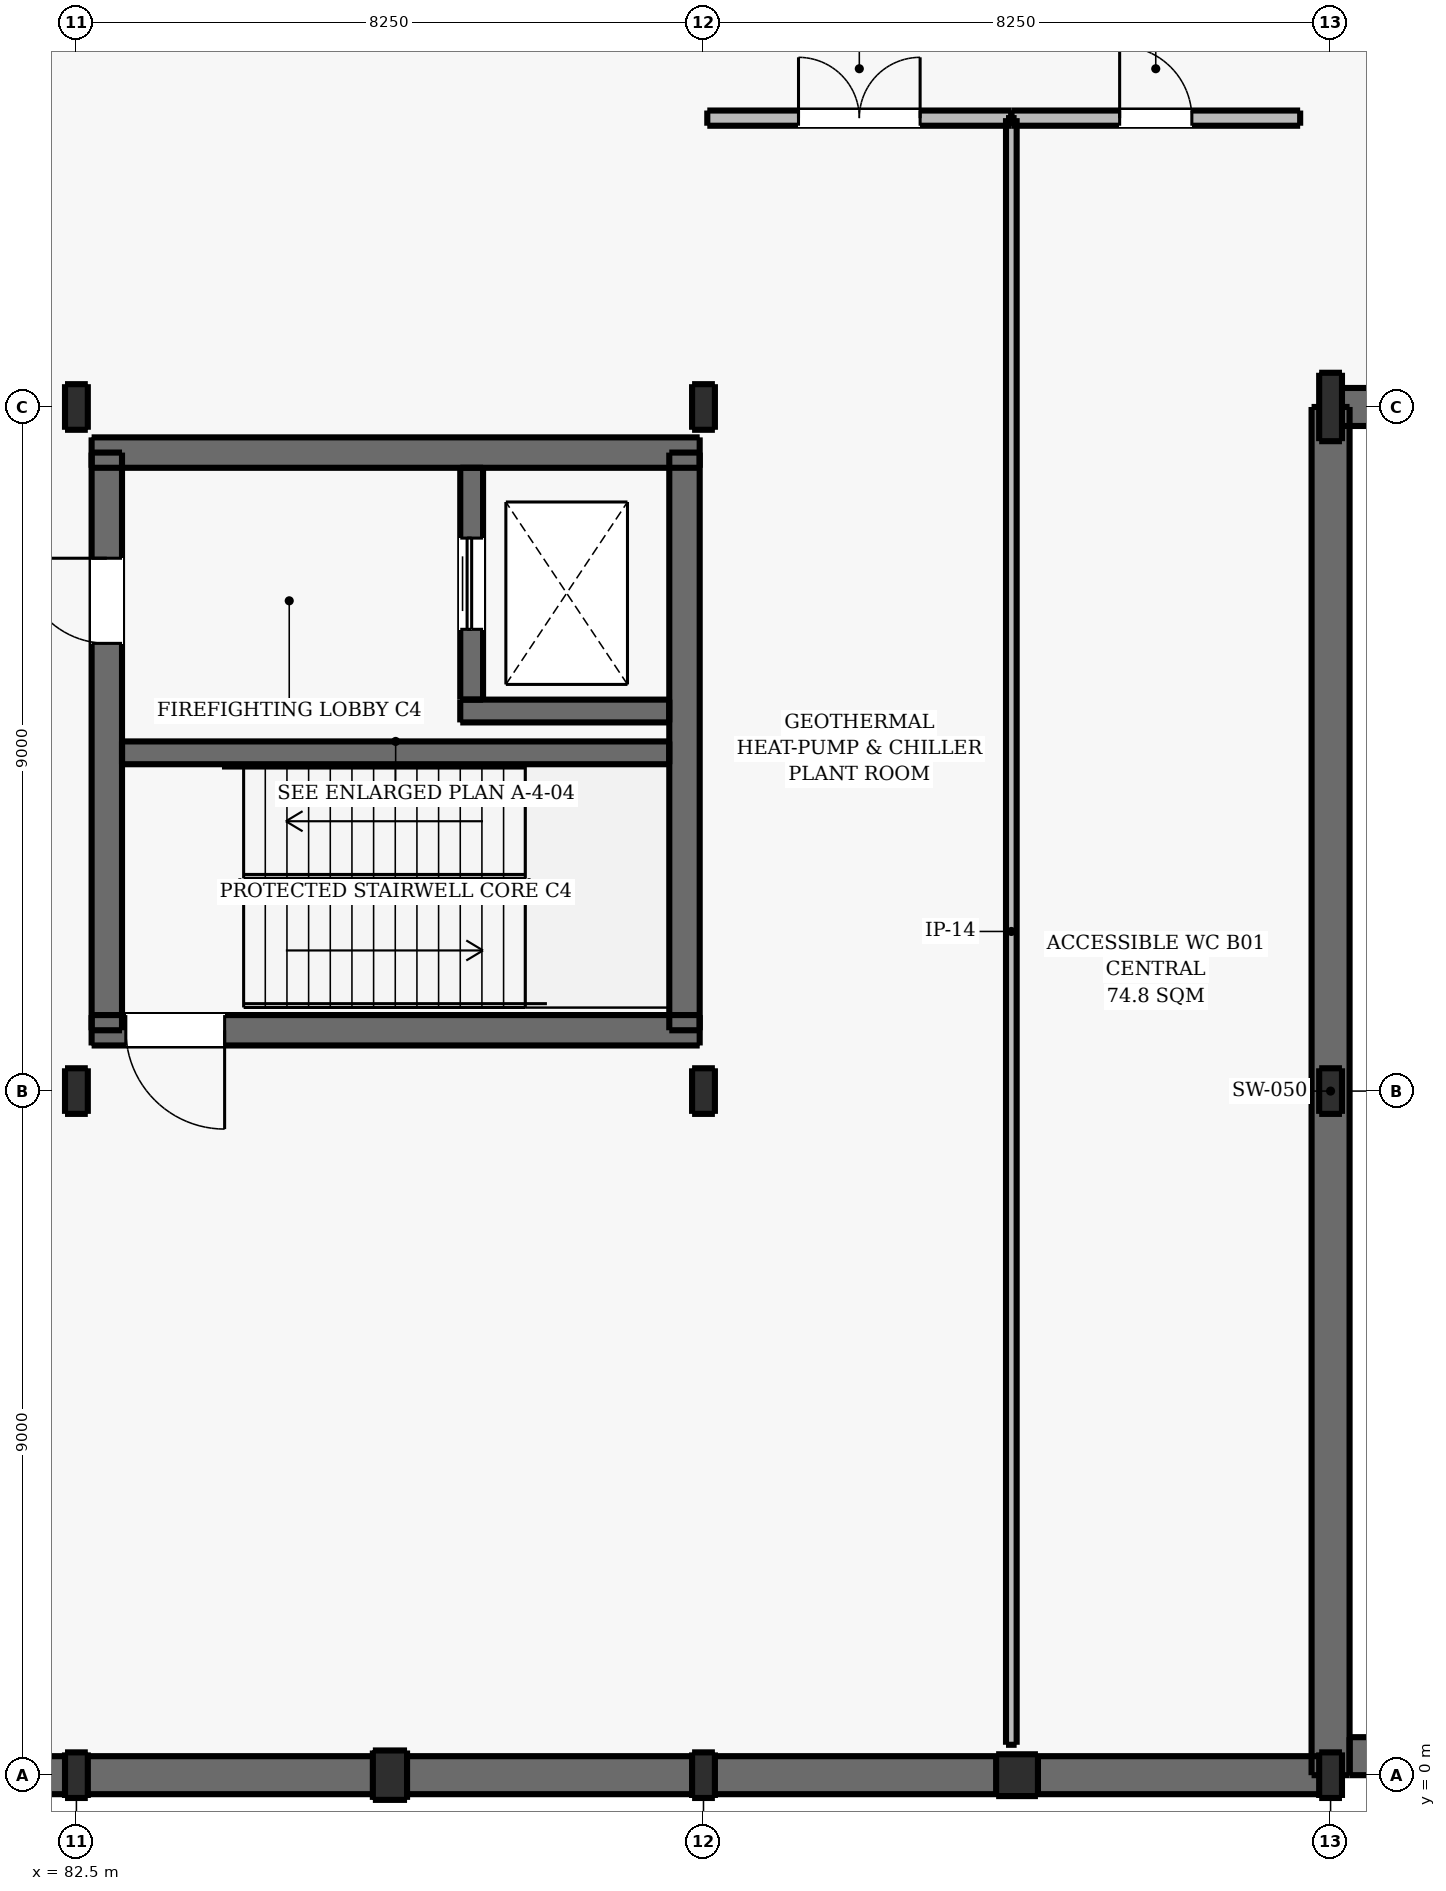
"""IFC4 building model, lengths in metres.
Left out: names, types, materials, properties, quantities, classifications, styles, units other than length and angle.
Written with IfcOpenShell. Run it as: python <this file> out.ifc"""

import sys

from ifc_helpers import new_model, si_unit, direction, frame, frame_2d, origin, origin_2d, place, context, subcontext, project, spatial, rectangle, i_section, extrude, element, fill, save


model = new_model("IFC4")
c1 = context("Model", 3, precision=1e-05, world=origin(), true_north=direction((0.0, 1.0)))
c2 = subcontext(c1, "Body", "Model", "MODEL_VIEW")
j1 = project(units=[si_unit("LENGTHUNIT", "METRE"), si_unit("PLANEANGLEUNIT", "RADIAN")], contexts=[c1])
p1 = place(None, origin())
s1 = spatial("IfcSite", under=j1, at=p1, CompositionType="ELEMENT")
p2 = place(p1, origin())
s2 = spatial("IfcBuilding", under=s1, at=p2, CompositionType="ELEMENT")
p3 = place(p2, frame((0.0, 0.0, -4.8)))
s3 = spatial("IfcBuildingStorey", under=s2, at=p3, CompositionType="ELEMENT", Elevation=-4.8)
for number, where, z_axis, x_axis in (
    (1, (82.5, 0.0, 0.0), (0.0, 0.0, 1.0), (1.0, 0.0, 0.0)),
    (2, (82.5, 9.0, 0.0), (0.0, 0.0, 1.0), (1.0, 0.0, 0.0)),
    (3, (82.5, 18.0, 0.0), (0.0, 0.0, 1.0), (1.0, 0.0, 0.0)),
):
    element("IfcColumn", number, at=place(p3, frame(where, z_axis=z_axis, x_axis=x_axis)), inside=s3, PredefinedType="COLUMN", context=c2, shape_type="SweptSolid", body=[
        extrude(i_section(OverallWidth=0.3, OverallDepth=0.6, WebThickness=0.015, FlangeThickness=0.03, FilletRadius=0.027, at=origin_2d()), origin(), (0.0, 0.0, 1.0), 4.8),
    ])
p4 = place(p3, frame((86.625, 0.0, 0.0), z_axis=(0.0, 0.0, 1.0), x_axis=(1.0, 0.0, 0.0)))
e4 = element("IfcColumn", 4, at=p4, inside=s3, PredefinedType="PILASTER", context=c2, shape_type="SweptSolid", body=[
    extrude(rectangle(XDim=0.45, YDim=0.65, at=origin_2d()), origin(), (0.0, 0.0, 1.0), 4.8),
])
for number, where, z_axis, x_axis in (
    (5, (90.75, 0.0, 0.0), (0.0, 0.0, 1.0), (1.0, 0.0, 0.0)),
    (6, (90.75, 9.0, 0.0), (0.0, 0.0, 1.0), (1.0, 0.0, 0.0)),
    (7, (90.75, 18.0, 0.0), (0.0, 0.0, 1.0), (1.0, 0.0, 0.0)),
):
    element("IfcColumn", number, at=place(p3, frame(where, z_axis=z_axis, x_axis=x_axis)), inside=s3, PredefinedType="COLUMN", context=c2, shape_type="SweptSolid", body=[
        extrude(i_section(OverallWidth=0.3, OverallDepth=0.6, WebThickness=0.015, FlangeThickness=0.03, FilletRadius=0.027, at=origin_2d()), origin(), (0.0, 0.0, 1.0), 4.8),
    ])
p5 = place(p3, frame((94.875, 0.0, 0.0), z_axis=(0.0, 0.0, 1.0), x_axis=(1.0, 0.0, 0.0)))
e8 = element("IfcColumn", 8, at=p5, inside=s3, PredefinedType="PILASTER", context=c2, shape_type="SweptSolid", body=[
    extrude(rectangle(XDim=0.55, YDim=0.55, at=origin_2d()), origin(), (0.0, 0.0, 1.0), 4.8),
])
for number, where, z_axis, x_axis in (
    (9, (99.0, 0.0, 0.0), (0.0, 0.0, 1.0), (1.0, 0.0, 0.0)),
    (10, (99.0, 9.0, 0.0), (0.0, 0.0, 1.0), (1.0, 0.0, 0.0)),
):
    element("IfcColumn", number, at=place(p3, frame(where, z_axis=z_axis, x_axis=x_axis)), inside=s3, PredefinedType="COLUMN", context=c2, shape_type="SweptSolid", body=[
        extrude(i_section(OverallWidth=0.3, OverallDepth=0.6, WebThickness=0.015, FlangeThickness=0.03, FilletRadius=0.027, at=origin_2d()), origin(), (0.0, 0.0, 1.0), 4.8),
    ])
p6 = place(p3, frame((99.0, 18.0, 0.0), z_axis=(0.0, 0.0, 1.0), x_axis=(1.0, 0.0, 0.0)))
e11 = element("IfcColumn", 11, at=p6, inside=s3, PredefinedType="COLUMN", context=c2, shape_type="SweptSolid", body=[
    extrude(i_section(OverallWidth=0.3, OverallDepth=0.9, WebThickness=0.019, FlangeThickness=0.035, FilletRadius=0.03, at=origin_2d()), origin(), (0.0, 0.0, 1.0), 4.8),
])
p7 = place(p3, frame((162.0, 18.0, 0.0), z_axis=(0.0, 0.0, 1.0), x_axis=(-1.0, 0.0, 0.0)))
e12 = element("IfcWall", 12, at=p7, inside=s3, PredefinedType="SOLIDWALL", context=c2, shape_type="SweptSolid", body=[
    extrude(rectangle(XDim=63.0, YDim=0.5, at=frame_2d((31.5, 0.0))), origin(), (0.0, 0.0, 1.0), 4.5),
])
p8 = place(p3, frame((99.0, 18.0, 0.0), z_axis=(0.0, 0.0, 1.0), x_axis=(0.0, -1.0, 0.0)))
e13 = element("IfcWall", 13, at=p8, inside=s3, PredefinedType="SOLIDWALL", context=c2, shape_type="SweptSolid", body=[
    extrude(rectangle(XDim=18.0, YDim=0.5, at=frame_2d((9.0, 0.0))), origin(), (0.0, 0.0, 1.0), 4.5),
])
p9 = place(p3, frame((99.0, 0.0, 0.0), z_axis=(0.0, 0.0, 1.0), x_axis=(-1.0, 0.0, 0.0)))
e14 = element("IfcWall", 14, at=p9, inside=s3, PredefinedType="SOLIDWALL", context=c2, shape_type="SweptSolid", body=[
    extrude(rectangle(XDim=45.0, YDim=0.5, at=frame_2d((22.5, 0.0))), origin(), (0.0, 0.0, 1.0), 4.5),
])
p10 = place(p3, frame((99.25, 0.25, 0.0), z_axis=(0.0, 0.0, 1.0), x_axis=(1.0, 0.0, 0.0)))
e15 = element("IfcWall", 15, at=p10, inside=s3, PredefinedType="SOLIDWALL", context=c2, shape_type="SweptSolid", body=[
    extrude(rectangle(XDim=62.75, YDim=0.5, at=frame_2d((31.375, 0.0))), origin(), (0.0, 0.0, 1.0), 4.5),
])
p11 = place(p3, frame((82.7, 9.8, 0.0), z_axis=(0.0, 0.0, 1.0), x_axis=(1.0, 0.0, 0.0)))
e16 = element("IfcWall", 16, at=p11, inside=s3, PredefinedType="SHEAR", context=c2, shape_type="SweptSolid", body=[
    extrude(rectangle(XDim=8.0, YDim=0.4, at=frame_2d((4.0, 0.0))), origin(), (0.0, 0.0, 1.0), 4.8),
])
p12 = place(p11, frame((0.45, 0.0, 0.0)))
e17 = element("IfcOpeningElement", 17, at=p12, cuts=e16, PredefinedType="OPENING", context=c2, shape_type="SweptSolid", body=[
    extrude(rectangle(XDim=1.3, YDim=2.15, at=frame_2d((0.65, 1.075))), frame((0.0, 0.21, 0.0), z_axis=(0.0, -1.0, 0.0), x_axis=(1.0, 0.0, 0.0)), (0.0, 0.0, 1.0), 0.42),
])
p13 = place(p3, frame((82.7, 17.4, 0.0), z_axis=(0.0, 0.0, 1.0), x_axis=(1.0, 0.0, 0.0)))
e18 = element("IfcWall", 18, at=p13, inside=s3, PredefinedType="SHEAR", context=c2, shape_type="SweptSolid", body=[
    extrude(rectangle(XDim=8.0, YDim=0.4, at=frame_2d((4.0, 0.0))), origin(), (0.0, 0.0, 1.0), 4.8),
])
p14 = place(p3, frame((82.9, 9.8, 0.0), z_axis=(0.0, 0.0, 1.0), x_axis=(0.0, 1.0, 0.0)))
e19 = element("IfcWall", 19, at=p14, inside=s3, PredefinedType="SHEAR", context=c2, shape_type="SweptSolid", body=[
    extrude(rectangle(XDim=7.6, YDim=0.4, at=frame_2d((3.8, 0.0))), origin(), (0.0, 0.0, 1.0), 4.8),
])
p15 = place(p14, frame((5.09, 0.0, 0.0)))
e20 = element("IfcOpeningElement", 20, at=p15, cuts=e19, PredefinedType="OPENING", context=c2, shape_type="SweptSolid", body=[
    extrude(rectangle(XDim=1.12, YDim=2.15, at=frame_2d((0.56, 1.075))), frame((0.0, 0.21, 0.0), z_axis=(0.0, -1.0, 0.0), x_axis=(1.0, 0.0, 0.0)), (0.0, 0.0, 1.0), 0.42),
])
p16 = place(p3, frame((90.5, 9.8, 0.0), z_axis=(0.0, 0.0, 1.0), x_axis=(0.0, 1.0, 0.0)))
e21 = element("IfcWall", 21, at=p16, inside=s3, PredefinedType="SHEAR", context=c2, shape_type="SweptSolid", body=[
    extrude(rectangle(XDim=7.6, YDim=0.4, at=frame_2d((3.8, 0.0))), origin(), (0.0, 0.0, 1.0), 4.8),
])
p17 = place(p3, frame((83.1, 13.45, 0.0), z_axis=(0.0, 0.0, 1.0), x_axis=(1.0, 0.0, 0.0)))
e22 = element("IfcWall", 22, at=p17, inside=s3, PredefinedType="SHEAR", context=c2, shape_type="SweptSolid", body=[
    extrude(rectangle(XDim=7.2, YDim=0.3, at=frame_2d((3.6, 0.0))), origin(), (0.0, 0.0, 1.0), 4.8),
])
p18 = place(p3, frame((87.55, 14.0, 0.0), z_axis=(0.0, 0.0, 1.0), x_axis=(1.0, 0.0, 0.0)))
e23 = element("IfcWall", 23, at=p18, inside=s3, PredefinedType="SHEAR", context=c2, shape_type="SweptSolid", body=[
    extrude(rectangle(XDim=2.75, YDim=0.3, at=frame_2d((1.375, 0.0))), origin(), (0.0, 0.0, 1.0), 4.8),
])
p19 = place(p3, frame((87.7, 14.15, 0.0), z_axis=(0.0, 0.0, 1.0), x_axis=(0.0, 1.0, 0.0)))
e24 = element("IfcWall", 24, at=p19, inside=s3, PredefinedType="SHEAR", context=c2, shape_type="SweptSolid", body=[
    extrude(rectangle(XDim=3.05, YDim=0.3, at=frame_2d((1.525, 0.0))), origin(), (0.0, 0.0, 1.0), 4.8),
])
p20 = place(p19, frame((0.925, 0.0, 0.0)))
e25 = element("IfcOpeningElement", 25, at=p20, cuts=e24, PredefinedType="OPENING", context=c2, shape_type="SweptSolid", body=[
    extrude(rectangle(XDim=1.2, YDim=2.15, at=frame_2d((0.6, 1.075))), frame((0.0, 0.16, 0.0), z_axis=(0.0, -1.0, 0.0), x_axis=(1.0, 0.0, 0.0)), (0.0, 0.0, 1.0), 0.32),
])
p21 = place(p3, frame((90.8, 21.8, 0.0), z_axis=(0.0, 0.0, 1.0), x_axis=(1.0, 0.0, 0.0)))
e26 = element("IfcWall", 26, at=p21, inside=s3, PredefinedType="PARTITIONING", context=c2, shape_type="SweptSolid", body=[
    extrude(rectangle(XDim=4.0, YDim=0.2, at=frame_2d((2.0, 0.0))), origin(), (0.0, 0.0, 1.0), 4.5),
])
p22 = place(p21, frame((1.2, 0.0, 0.0)))
e27 = element("IfcOpeningElement", 27, at=p22, cuts=e26, PredefinedType="OPENING", context=c2, shape_type="SweptSolid", body=[
    extrude(rectangle(XDim=1.6, YDim=2.25, at=frame_2d((0.8, 1.125))), frame((0.0, 0.11, 0.0), z_axis=(0.0, -1.0, 0.0), x_axis=(1.0, 0.0, 0.0)), (0.0, 0.0, 1.0), 0.22),
])
p23 = place(p3, frame((94.8, 0.4, 0.0), z_axis=(0.0, 0.0, 1.0), x_axis=(0.0, 1.0, 0.0)))
e28 = element("IfcWall", 28, at=p23, inside=s3, PredefinedType="PARTITIONING", context=c2, shape_type="SweptSolid", body=[
    extrude(rectangle(XDim=21.4, YDim=0.14, at=frame_2d((10.7, 0.0))), origin(), (0.0, 0.0, 1.0), 4.5),
])
p24 = place(p3, frame((94.8, 21.8, 0.0), z_axis=(0.0, 0.0, 1.0), x_axis=(1.0, 0.0, 0.0)))
e29 = element("IfcWall", 29, at=p24, inside=s3, PredefinedType="PARTITIONING", context=c2, shape_type="SweptSolid", body=[
    extrude(rectangle(XDim=3.8, YDim=0.2, at=frame_2d((1.9, 0.0))), origin(), (0.0, 0.0, 1.0), 4.5),
])
p25 = place(p24, frame((1.425, 0.0, 0.0)))
e30 = element("IfcOpeningElement", 30, at=p25, cuts=e29, PredefinedType="OPENING", context=c2, shape_type="SweptSolid", body=[
    extrude(rectangle(XDim=0.95, YDim=2.1, at=frame_2d((0.475, 1.05))), frame((0.0, 0.11, 0.0), z_axis=(0.0, -1.0, 0.0), x_axis=(1.0, 0.0, 0.0)), (0.0, 0.0, 1.0), 0.22),
])
p26 = place(p20, origin())
e31 = element("IfcDoor", 31, at=p26, inside=s3, OperationType="DOUBLE_DOOR_SLIDING", PredefinedType="DOOR", context=c2, shape_type="SweptSolid", body=[
    extrude(rectangle(XDim=1.2, YDim=2.15, at=frame_2d((0.6, 1.075))), frame((0.0, 0.025, 0.0), z_axis=(0.0, -1.0, 0.0), x_axis=(1.0, 0.0, 0.0)), (0.0, 0.0, 1.0), 0.05),
])
fill(e25, e31)
p27 = place(p15, origin())
e32 = element("IfcDoor", 32, at=p27, inside=s3, OperationType="SINGLE_SWING_RIGHT", PredefinedType="DOOR", context=c2, shape_type="SweptSolid", body=[
    extrude(rectangle(XDim=1.12, YDim=2.15, at=frame_2d((0.56, 1.075))), frame((0.0, 0.025, 0.0), z_axis=(0.0, -1.0, 0.0), x_axis=(1.0, 0.0, 0.0)), (0.0, 0.0, 1.0), 0.05),
])
fill(e20, e32)
p28 = place(p12, frame((1.3, 0.0, 0.0), z_axis=(0.0, 0.0, 1.0), x_axis=(-1.0, 0.0, 0.0)))
e33 = element("IfcDoor", 33, at=p28, inside=s3, OperationType="SINGLE_SWING_RIGHT", PredefinedType="DOOR", context=c2, shape_type="SweptSolid", body=[
    extrude(rectangle(XDim=1.3, YDim=2.15, at=frame_2d((0.65, 1.075))), frame((0.0, 0.025, 0.0), z_axis=(0.0, -1.0, 0.0), x_axis=(1.0, 0.0, 0.0)), (0.0, 0.0, 1.0), 0.05),
])
fill(e17, e33)
p29 = place(p22, origin())
e34 = element("IfcDoor", 34, at=p29, inside=s3, OperationType="DOUBLE_DOOR_SINGLE_SWING", PredefinedType="DOOR", context=c2, shape_type="SweptSolid", body=[
    extrude(rectangle(XDim=1.6, YDim=2.25, at=frame_2d((0.8, 1.125))), frame((0.0, 0.025, 0.0), z_axis=(0.0, -1.0, 0.0), x_axis=(1.0, 0.0, 0.0)), (0.0, 0.0, 1.0), 0.05),
])
fill(e27, e34)
p30 = place(p25, origin())
e35 = element("IfcDoor", 35, at=p30, inside=s3, OperationType="SINGLE_SWING_LEFT", PredefinedType="DOOR", context=c2, shape_type="SweptSolid", body=[
    extrude(rectangle(XDim=0.95, YDim=2.1, at=frame_2d((0.475, 1.05))), frame((0.0, 0.025, 0.0), z_axis=(0.0, -1.0, 0.0), x_axis=(1.0, 0.0, 0.0)), (0.0, 0.0, 1.0), 0.05),
])
fill(e30, e35)
save(model, sys.argv[1])
